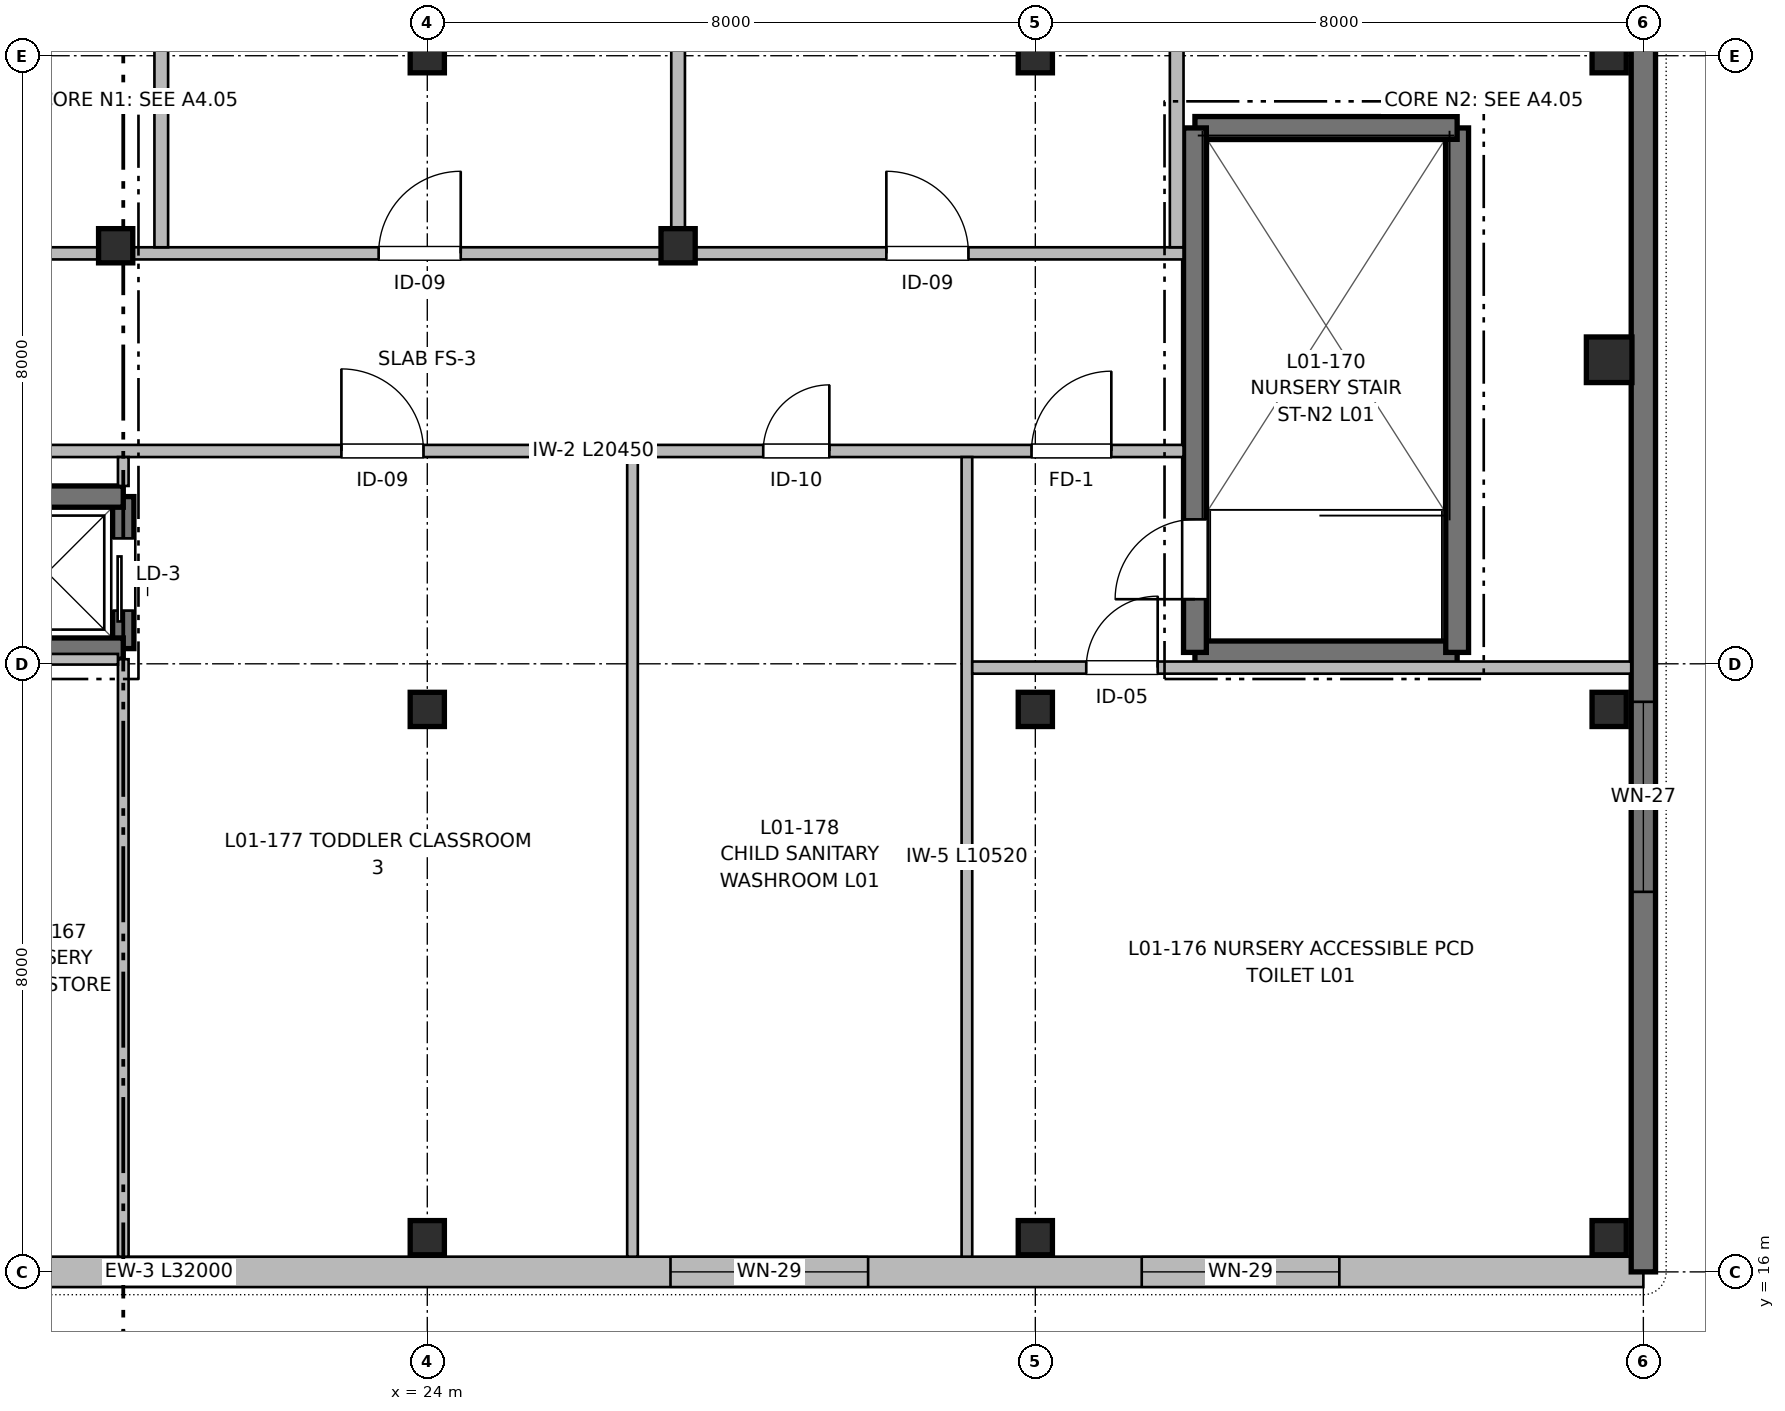
"""IFC4 building model, lengths in metres.
Left out: names, types, materials, properties, quantities, classifications, styles, units other than length and angle.
Written with IfcOpenShell. Run it as: python <this file> out.ifc"""

import sys

from ifc_helpers import new_model, si_unit, direction, frame, frame_2d, origin, origin_2d, place, context, subcontext, project, spatial, rectangle, extrude, element, fill, save


model = new_model("IFC4")
c1 = context("Model", 3, precision=1e-05, world=origin(), true_north=direction((0.0, 1.0)))
c2 = subcontext(c1, "Body", "Model", "MODEL_VIEW")
j1 = project(units=[si_unit("LENGTHUNIT", "METRE"), si_unit("PLANEANGLEUNIT", "RADIAN")], contexts=[c1])
p1 = place(None, origin())
s1 = spatial("IfcSite", under=j1, at=p1, CompositionType="ELEMENT")
p2 = place(p1, origin())
s2 = spatial("IfcBuilding", under=s1, at=p2, CompositionType="ELEMENT")
p3 = place(p2, frame((0.0, 0.0, 4.16)))
s3 = spatial("IfcBuildingStorey", under=s2, at=p3, CompositionType="ELEMENT", Elevation=4.16)
p4 = place(p3, frame((19.9, 29.5, 0.0), z_axis=(0.0, 0.0, 1.0), x_axis=(1.0, 0.0, 0.0)))
e1 = element("IfcColumn", 1, at=p4, inside=s3, PredefinedType="COLUMN", context=c2, shape_type="SweptSolid", body=[
    extrude(rectangle(XDim=0.45, YDim=0.45, at=origin_2d()), origin(), (0.0, 0.0, 1.0), 4.89),
])
for number, where, z_axis, x_axis in (
    (2, (24.0, 16.45, 0.0), (0.0, 0.0, 1.0), (1.0, 0.0, 0.0)),
    (3, (24.0, 23.4, 0.0), (0.0, 0.0, 1.0), (1.0, 0.0, 0.0)),
    (4, (24.0, 32.0, 0.0), (0.0, 0.0, 1.0), (1.0, 0.0, 0.0)),
):
    element("IfcColumn", number, at=place(p3, frame(where, z_axis=z_axis, x_axis=x_axis)), inside=s3, PredefinedType="COLUMN", context=c2, shape_type="SweptSolid", body=[
        extrude(rectangle(XDim=0.45, YDim=0.45, at=origin_2d()), origin(), (0.0, 0.0, 1.0), 3.2),
    ])
p5 = place(p3, frame((27.3, 29.5, 0.0), z_axis=(0.0, 0.0, 1.0), x_axis=(1.0, 0.0, 0.0)))
e5 = element("IfcColumn", 5, at=p5, inside=s3, PredefinedType="COLUMN", context=c2, shape_type="SweptSolid", body=[
    extrude(rectangle(XDim=0.45, YDim=0.45, at=origin_2d()), origin(), (0.0, 0.0, 1.0), 4.89),
])
for number, where, z_axis, x_axis in (
    (6, (32.0, 16.45, 0.0), (0.0, 0.0, 1.0), (1.0, 0.0, 0.0)),
    (7, (32.0, 23.4, 0.0), (0.0, 0.0, 1.0), (1.0, 0.0, 0.0)),
    (8, (32.0, 32.0, 0.0), (0.0, 0.0, 1.0), (1.0, 0.0, 0.0)),
    (9, (39.55, 16.45, 0.0), (0.0, 0.0, 1.0), (1.0, 0.0, 0.0)),
    (10, (39.55, 23.4, 0.0), (0.0, 0.0, 1.0), (1.0, 0.0, 0.0)),
):
    element("IfcColumn", number, at=place(p3, frame(where, z_axis=z_axis, x_axis=x_axis)), inside=s3, PredefinedType="COLUMN", context=c2, shape_type="SweptSolid", body=[
        extrude(rectangle(XDim=0.45, YDim=0.45, at=origin_2d()), origin(), (0.0, 0.0, 1.0), 3.2),
    ])
p6 = place(p3, frame((39.55, 28.0, 0.0), z_axis=(0.0, 0.0, 1.0), x_axis=(1.0, 0.0, 0.0)))
e11 = element("IfcColumn", 11, at=p6, inside=s3, PredefinedType="COLUMN", context=c2, shape_type="SweptSolid", body=[
    extrude(rectangle(XDim=0.6, YDim=0.6, at=origin_2d()), origin(), (0.0, 0.0, 1.0), 5.19),
])
p7 = place(p3, frame((39.55, 32.0, 0.0), z_axis=(0.0, 0.0, 1.0), x_axis=(1.0, 0.0, 0.0)))
e12 = element("IfcColumn", 12, at=p7, inside=s3, PredefinedType="COLUMN", context=c2, shape_type="SweptSolid", body=[
    extrude(rectangle(XDim=0.45, YDim=0.45, at=origin_2d()), origin(), (0.0, 0.0, 1.0), 3.2),
])
p8 = place(p3, frame((40.0, 16.0, 0.0), z_axis=(0.0, 0.0, 1.0), x_axis=(-1.0, 0.0, 0.0)))
e13 = element("IfcWall", 13, at=p8, inside=s3, PredefinedType="SOLIDWALL", context=c2, shape_type="SweptSolid", body=[
    extrude(rectangle(XDim=32.0, YDim=0.4, at=frame_2d((16.0, 0.0))), origin(), (0.0, 0.0, 1.0), 3.06),
])
p9 = place(p8, frame((4.0, 0.0, 1.32)))
e14 = element("IfcOpeningElement", 14, at=p9, cuts=e13, PredefinedType="OPENING", context=c2, shape_type="SweptSolid", body=[
    extrude(rectangle(XDim=2.6, YDim=0.9, at=frame_2d((1.3, 0.45))), frame((0.0, 0.21, 0.0), z_axis=(0.0, -1.0, 0.0), x_axis=(1.0, 0.0, 0.0)), (0.0, 0.0, 1.0), 0.42),
])
p10 = place(p8, frame((10.2, 0.0, 1.32)))
e15 = element("IfcOpeningElement", 15, at=p10, cuts=e13, PredefinedType="OPENING", context=c2, shape_type="SweptSolid", body=[
    extrude(rectangle(XDim=2.6, YDim=0.9, at=frame_2d((1.3, 0.45))), frame((0.0, 0.21, 0.0), z_axis=(0.0, -1.0, 0.0), x_axis=(1.0, 0.0, 0.0)), (0.0, 0.0, 1.0), 0.42),
])
p11 = place(p8, frame((26.0, 0.0, 1.32)))
e16 = element("IfcOpeningElement", 16, at=p11, cuts=e13, PredefinedType="OPENING", context=c2, shape_type="SweptSolid", body=[
    extrude(rectangle(XDim=2.6, YDim=0.9, at=frame_2d((1.3, 0.45))), frame((0.0, 0.21, 0.0), z_axis=(0.0, -1.0, 0.0), x_axis=(1.0, 0.0, 0.0)), (0.0, 0.0, 1.0), 0.42),
])
p12 = place(p3, frame((40.0, 40.0, 0.0), z_axis=(0.0, 0.0, 1.0), x_axis=(0.0, -1.0, 0.0)))
e17 = element("IfcWall", 17, at=p12, inside=s3, PredefinedType="SHEAR", context=c2, shape_type="SweptSolid", body=[
    extrude(rectangle(XDim=24.0, YDim=0.32, at=frame_2d((12.0, 0.0))), origin(), (0.0, 0.0, 1.0), 3.06),
])
p13 = place(p12, frame((4.5, 0.0, 0.57)))
e18 = element("IfcOpeningElement", 18, at=p13, cuts=e17, PredefinedType="OPENING", context=c2, shape_type="SweptSolid", body=[
    extrude(rectangle(XDim=2.5, YDim=1.65, at=frame_2d((1.25, 0.825))), frame((0.0, 0.17, 0.0), z_axis=(0.0, -1.0, 0.0), x_axis=(1.0, 0.0, 0.0)), (0.0, 0.0, 1.0), 0.34),
])
p14 = place(p12, frame((16.5, 0.0, 0.57)))
e19 = element("IfcOpeningElement", 19, at=p14, cuts=e17, PredefinedType="OPENING", context=c2, shape_type="SweptSolid", body=[
    extrude(rectangle(XDim=2.5, YDim=1.65, at=frame_2d((1.25, 0.825))), frame((0.0, 0.17, 0.0), z_axis=(0.0, -1.0, 0.0), x_axis=(1.0, 0.0, 0.0)), (0.0, 0.0, 1.0), 0.34),
])
p15 = place(p3, frame((34.1, 24.15, 0.0), z_axis=(0.0, 0.0, 1.0), x_axis=(1.0, 0.0, 0.0)))
e20 = element("IfcWall", 20, at=p15, inside=s3, PredefinedType="SHEAR", context=c2, shape_type="SweptSolid", body=[
    extrude(rectangle(XDim=3.45, YDim=0.3, at=frame_2d((1.725, 0.0))), origin(), (0.0, 0.0, 1.0), 3.2),
])
p16 = place(p3, frame((37.55, 31.05, 0.0), z_axis=(0.0, 0.0, 1.0), x_axis=(0.0, -1.0, 0.0)))
e21 = element("IfcWall", 21, at=p16, inside=s3, PredefinedType="SHEAR", context=c2, shape_type="SweptSolid", body=[
    extrude(rectangle(XDim=6.9, YDim=0.3, at=frame_2d((3.45, 0.0))), origin(), (0.0, 0.0, 1.0), 3.2),
])
p17 = place(p3, frame((34.1, 31.05, 0.0), z_axis=(0.0, 0.0, 1.0), x_axis=(1.0, 0.0, 0.0)))
e22 = element("IfcWall", 22, at=p17, inside=s3, PredefinedType="SHEAR", context=c2, shape_type="SweptSolid", body=[
    extrude(rectangle(XDim=3.45, YDim=0.3, at=frame_2d((1.725, 0.0))), origin(), (0.0, 0.0, 1.0), 3.2),
])
p18 = place(p3, frame((34.1, 24.15, 0.0), z_axis=(0.0, 0.0, 1.0), x_axis=(0.0, 1.0, 0.0)))
e23 = element("IfcWall", 23, at=p18, inside=s3, PredefinedType="SHEAR", context=c2, shape_type="SweptSolid", body=[
    extrude(rectangle(XDim=6.9, YDim=0.3, at=frame_2d((3.45, 0.0))), origin(), (0.0, 0.0, 1.0), 3.2),
])
p19 = place(p18, frame((0.7, 0.0, 0.0)))
e24 = element("IfcOpeningElement", 24, at=p19, cuts=e23, PredefinedType="OPENING", context=c2, shape_type="SweptSolid", body=[
    extrude(rectangle(XDim=1.05, YDim=2.15, at=frame_2d((0.525, 1.075))), frame((0.0, 0.16, 0.0), z_axis=(0.0, -1.0, 0.0), x_axis=(1.0, 0.0, 0.0)), (0.0, 0.0, 1.0), 0.32),
])
p20 = place(p3, frame((20.0, 24.2, 0.0), z_axis=(0.0, 0.0, 1.0), x_axis=(0.0, 1.0, 0.0)))
e25 = element("IfcWall", 25, at=p20, inside=s3, PredefinedType="SHEAR", context=c2, shape_type="SweptSolid", body=[
    extrude(rectangle(XDim=2.0, YDim=0.28, at=frame_2d((1.0, 0.0))), origin(), (0.0, 0.0, 1.0), 3.06),
])
p21 = place(p20, frame((0.5, 0.0, 0.0)))
e26 = element("IfcOpeningElement", 26, at=p21, cuts=e25, PredefinedType="OPENING", context=c2, shape_type="SweptSolid", body=[
    extrude(rectangle(XDim=0.95, YDim=2.15, at=frame_2d((0.475, 1.075))), frame((0.0, 0.15, 0.0), z_axis=(0.0, -1.0, 0.0), x_axis=(1.0, 0.0, 0.0)), (0.0, 0.0, 1.0), 0.3),
])
for number, where, z_axis, x_axis in (
    (27, (18.0, 24.2, 0.0), (0.0, 0.0, 1.0), (1.0, 0.0, 0.0)),
    (28, (18.0, 26.2, 0.0), (0.0, 0.0, 1.0), (1.0, 0.0, 0.0)),
):
    element("IfcWall", number, at=place(p3, frame(where, z_axis=z_axis, x_axis=x_axis)), inside=s3, PredefinedType="SHEAR", context=c2, shape_type="SweptSolid", body=[
        extrude(rectangle(XDim=2.0, YDim=0.28, at=frame_2d((1.0, 0.0))), origin(), (0.0, 0.0, 1.0), 3.06),
    ])
p22 = place(p3, frame((13.5, 26.8, 0.0), z_axis=(0.0, 0.0, 1.0), x_axis=(1.0, 0.0, 0.0)))
e29 = element("IfcWall", 29, at=p22, inside=s3, PredefinedType="PARTITIONING", context=c2, shape_type="SweptSolid", body=[
    extrude(rectangle(XDim=20.45, YDim=0.16, at=frame_2d((10.225, 0.0))), origin(), (0.0, 0.0, 1.0), 2.94),
])
p23 = place(p22, frame((1.65, 0.0, 0.0)))
e30 = element("IfcOpeningElement", 30, at=p23, cuts=e29, PredefinedType="OPENING", context=c2, shape_type="SweptSolid", body=[
    extrude(rectangle(XDim=1.05, YDim=2.15, at=frame_2d((0.525, 1.075))), frame((0.0, 0.09, 0.0), z_axis=(0.0, -1.0, 0.0), x_axis=(1.0, 0.0, 0.0)), (0.0, 0.0, 1.0), 0.18),
])
p24 = place(p22, frame((18.45, 0.0, 0.0)))
e31 = element("IfcOpeningElement", 31, at=p24, cuts=e29, PredefinedType="OPENING", context=c2, shape_type="SweptSolid", body=[
    extrude(rectangle(XDim=1.05, YDim=2.15, at=frame_2d((0.525, 1.075))), frame((0.0, 0.09, 0.0), z_axis=(0.0, -1.0, 0.0), x_axis=(1.0, 0.0, 0.0)), (0.0, 0.0, 1.0), 0.18),
])
p25 = place(p22, frame((9.37, 0.0, 0.0)))
e32 = element("IfcOpeningElement", 32, at=p25, cuts=e29, PredefinedType="OPENING", context=c2, shape_type="SweptSolid", body=[
    extrude(rectangle(XDim=1.08, YDim=2.15, at=frame_2d((0.54, 1.075))), frame((0.0, 0.09, 0.0), z_axis=(0.0, -1.0, 0.0), x_axis=(1.0, 0.0, 0.0)), (0.0, 0.0, 1.0), 0.18),
])
p26 = place(p22, frame((14.92, 0.0, 0.0)))
e33 = element("IfcOpeningElement", 33, at=p26, cuts=e29, PredefinedType="OPENING", context=c2, shape_type="SweptSolid", body=[
    extrude(rectangle(XDim=0.87, YDim=2.05, at=frame_2d((0.435, 1.025))), frame((0.0, 0.09, 0.0), z_axis=(0.0, -1.0, 0.0), x_axis=(1.0, 0.0, 0.0)), (0.0, 0.0, 1.0), 0.18),
])
p27 = place(p3, frame((13.5, 29.4, 0.0), z_axis=(0.0, 0.0, 1.0), x_axis=(1.0, 0.0, 0.0)))
e34 = element("IfcWall", 34, at=p27, inside=s3, PredefinedType="PARTITIONING", context=c2, shape_type="SweptSolid", body=[
    extrude(rectangle(XDim=20.45, YDim=0.16, at=frame_2d((10.225, 0.0))), origin(), (0.0, 0.0, 1.0), 2.94),
])
p28 = place(p27, frame((3.005, 0.0, 0.0)))
e35 = element("IfcOpeningElement", 35, at=p28, cuts=e34, PredefinedType="OPENING", context=c2, shape_type="SweptSolid", body=[
    extrude(rectangle(XDim=1.08, YDim=2.15, at=frame_2d((0.54, 1.075))), frame((0.0, 0.09, 0.0), z_axis=(0.0, -1.0, 0.0), x_axis=(1.0, 0.0, 0.0)), (0.0, 0.0, 1.0), 0.18),
])
p29 = place(p27, frame((9.86, 0.0, 0.0)))
e36 = element("IfcOpeningElement", 36, at=p29, cuts=e34, PredefinedType="OPENING", context=c2, shape_type="SweptSolid", body=[
    extrude(rectangle(XDim=1.08, YDim=2.15, at=frame_2d((0.54, 1.075))), frame((0.0, 0.09, 0.0), z_axis=(0.0, -1.0, 0.0), x_axis=(1.0, 0.0, 0.0)), (0.0, 0.0, 1.0), 0.18),
])
p30 = place(p27, frame((16.54, 0.0, 0.0)))
e37 = element("IfcOpeningElement", 37, at=p30, cuts=e34, PredefinedType="OPENING", context=c2, shape_type="SweptSolid", body=[
    extrude(rectangle(XDim=1.08, YDim=2.15, at=frame_2d((0.54, 1.075))), frame((0.0, 0.09, 0.0), z_axis=(0.0, -1.0, 0.0), x_axis=(1.0, 0.0, 0.0)), (0.0, 0.0, 1.0), 0.18),
])
p31 = place(p3, frame((20.0, 16.2, 0.0), z_axis=(0.0, 0.0, 1.0), x_axis=(0.0, 1.0, 0.0)))
e38 = element("IfcWall", 38, at=p31, inside=s3, PredefinedType="PARTITIONING", context=c2, shape_type="SweptSolid", body=[
    extrude(rectangle(XDim=7.86, YDim=0.14, at=frame_2d((3.93, 0.0))), origin(), (0.0, 0.0, 1.0), 2.94),
])
p32 = place(p3, frame((20.0, 26.34, 0.0), z_axis=(0.0, 0.0, 1.0), x_axis=(0.0, 1.0, 0.0)))
e39 = element("IfcWall", 39, at=p32, inside=s3, PredefinedType="PARTITIONING", context=c2, shape_type="SweptSolid", body=[
    extrude(rectangle(XDim=0.38, YDim=0.14, at=frame_2d((0.19, 0.0))), origin(), (0.0, 0.0, 1.0), 2.94),
])
p33 = place(p3, frame((31.1, 16.2, 0.0), z_axis=(0.0, 0.0, 1.0), x_axis=(0.0, 1.0, 0.0)))
e40 = element("IfcWall", 40, at=p33, inside=s3, PredefinedType="PARTITIONING", context=c2, shape_type="SweptSolid", body=[
    extrude(rectangle(XDim=10.52, YDim=0.14, at=frame_2d((5.26, 0.0))), origin(), (0.0, 0.0, 1.0), 2.94),
])
p34 = place(p3, frame((18.07, 24.06, 0.0), z_axis=(0.0, 0.0, 1.0), x_axis=(1.0, 0.0, 0.0)))
e41 = element("IfcWall", 41, at=p34, inside=s3, PredefinedType="PARTITIONING", context=c2, shape_type="SweptSolid", body=[
    extrude(rectangle(XDim=1.86, YDim=0.14, at=frame_2d((0.93, 0.0))), origin(), (0.0, 0.0, 1.0), 2.94),
])
for number, where, z_axis, x_axis in (
    (42, (20.5, 29.48, 0.0), (0.0, 0.0, 1.0), (0.0, 1.0, 0.0)),
    (43, (27.3, 29.48, 0.0), (0.0, 0.0, 1.0), (0.0, 1.0, 0.0)),
    (44, (33.86, 29.48, 0.0), (0.0, 0.0, 1.0), (0.0, 1.0, 0.0)),
):
    element("IfcWall", number, at=place(p3, frame(where, z_axis=z_axis, x_axis=x_axis)), inside=s3, PredefinedType="PARTITIONING", context=c2, shape_type="SweptSolid", body=[
        extrude(rectangle(XDim=10.32, YDim=0.18, at=frame_2d((5.16, 0.0))), origin(), (0.0, 0.0, 1.0), 2.94),
    ])
p35 = place(p3, frame((31.17, 23.95, 0.0), z_axis=(0.0, 0.0, 1.0), x_axis=(1.0, 0.0, 0.0)))
e45 = element("IfcWall", 45, at=p35, inside=s3, PredefinedType="PARTITIONING", context=c2, shape_type="SweptSolid", body=[
    extrude(rectangle(XDim=8.67, YDim=0.16, at=frame_2d((4.335, 0.0))), origin(), (0.0, 0.0, 1.0), 2.94),
])
p36 = place(p35, frame((1.5, 0.0, 0.0)))
e46 = element("IfcOpeningElement", 46, at=p36, cuts=e45, PredefinedType="OPENING", context=c2, shape_type="SweptSolid", body=[
    extrude(rectangle(XDim=0.94, YDim=2.1, at=frame_2d((0.47, 1.05))), frame((0.0, 0.09, 0.0), z_axis=(0.0, -1.0, 0.0), x_axis=(1.0, 0.0, 0.0)), (0.0, 0.0, 1.0), 0.18),
])
p37 = place(p3, frame((26.7, 16.2, 0.0), z_axis=(0.0, 0.0, 1.0), x_axis=(0.0, 1.0, 0.0)))
e47 = element("IfcWall", 47, at=p37, inside=s3, PredefinedType="PARTITIONING", context=c2, shape_type="SweptSolid", body=[
    extrude(rectangle(XDim=10.52, YDim=0.14, at=frame_2d((5.26, 0.0))), origin(), (0.0, 0.0, 1.0), 2.94),
])
p38 = place(p9, origin())
e48 = element("IfcWindow", 48, at=p38, inside=s3, PartitioningType="SINGLE_PANEL", PredefinedType="WINDOW", context=c2, shape_type="SweptSolid", body=[
    extrude(rectangle(XDim=2.6, YDim=0.9, at=frame_2d((1.3, 0.45))), frame((0.0, 0.03, 0.0), z_axis=(0.0, -1.0, 0.0), x_axis=(1.0, 0.0, 0.0)), (0.0, 0.0, 1.0), 0.06),
])
fill(e14, e48)
p39 = place(p10, origin())
e49 = element("IfcWindow", 49, at=p39, inside=s3, PartitioningType="SINGLE_PANEL", PredefinedType="WINDOW", context=c2, shape_type="SweptSolid", body=[
    extrude(rectangle(XDim=2.6, YDim=0.9, at=frame_2d((1.3, 0.45))), frame((0.0, 0.03, 0.0), z_axis=(0.0, -1.0, 0.0), x_axis=(1.0, 0.0, 0.0)), (0.0, 0.0, 1.0), 0.06),
])
fill(e15, e49)
p40 = place(p14, origin())
e50 = element("IfcWindow", 50, at=p40, inside=s3, PartitioningType="SINGLE_PANEL", PredefinedType="WINDOW", context=c2, shape_type="SweptSolid", body=[
    extrude(rectangle(XDim=2.5, YDim=1.65, at=frame_2d((1.25, 0.825))), frame((0.0, 0.03, 0.0), z_axis=(0.0, -1.0, 0.0), x_axis=(1.0, 0.0, 0.0)), (0.0, 0.0, 1.0), 0.06),
])
fill(e19, e50)
p41 = place(p19, origin())
e51 = element("IfcDoor", 51, at=p41, inside=s3, OperationType="SINGLE_SWING_LEFT", PredefinedType="DOOR", context=c2, shape_type="SweptSolid", body=[
    extrude(rectangle(XDim=1.05, YDim=2.15, at=frame_2d((0.525, 1.075))), frame((0.0, 0.025, 0.0), z_axis=(0.0, -1.0, 0.0), x_axis=(1.0, 0.0, 0.0)), (0.0, 0.0, 1.0), 0.05),
])
fill(e24, e51)
p42 = place(p21, origin())
e52 = element("IfcDoor", 52, at=p42, inside=s3, OperationType="SLIDING_TO_LEFT", PredefinedType="DOOR", context=c2, shape_type="SweptSolid", body=[
    extrude(rectangle(XDim=0.95, YDim=2.15, at=frame_2d((0.475, 1.075))), frame((0.0, 0.025, 0.0), z_axis=(0.0, -1.0, 0.0), x_axis=(1.0, 0.0, 0.0)), (0.0, 0.0, 1.0), 0.05),
])
fill(e26, e52)
p43 = place(p24, origin())
e53 = element("IfcDoor", 53, at=p43, inside=s3, OperationType="SINGLE_SWING_RIGHT", PredefinedType="DOOR", context=c2, shape_type="SweptSolid", body=[
    extrude(rectangle(XDim=1.05, YDim=2.15, at=frame_2d((0.525, 1.075))), frame((0.0, 0.025, 0.0), z_axis=(0.0, -1.0, 0.0), x_axis=(1.0, 0.0, 0.0)), (0.0, 0.0, 1.0), 0.05),
])
fill(e31, e53)
p44 = place(p29, origin())
e54 = element("IfcDoor", 54, at=p44, inside=s3, OperationType="SINGLE_SWING_RIGHT", PredefinedType="DOOR", context=c2, shape_type="SweptSolid", body=[
    extrude(rectangle(XDim=1.08, YDim=2.15, at=frame_2d((0.54, 1.075))), frame((0.0, 0.025, 0.0), z_axis=(0.0, -1.0, 0.0), x_axis=(1.0, 0.0, 0.0)), (0.0, 0.0, 1.0), 0.05),
])
fill(e36, e54)
p45 = place(p30, origin())
e55 = element("IfcDoor", 55, at=p45, inside=s3, OperationType="SINGLE_SWING_LEFT", PredefinedType="DOOR", context=c2, shape_type="SweptSolid", body=[
    extrude(rectangle(XDim=1.08, YDim=2.15, at=frame_2d((0.54, 1.075))), frame((0.0, 0.025, 0.0), z_axis=(0.0, -1.0, 0.0), x_axis=(1.0, 0.0, 0.0)), (0.0, 0.0, 1.0), 0.05),
])
fill(e37, e55)
p46 = place(p36, origin())
e56 = element("IfcDoor", 56, at=p46, inside=s3, OperationType="SINGLE_SWING_RIGHT", PredefinedType="DOOR", context=c2, shape_type="SweptSolid", body=[
    extrude(rectangle(XDim=0.94, YDim=2.1, at=frame_2d((0.47, 1.05))), frame((0.0, 0.025, 0.0), z_axis=(0.0, -1.0, 0.0), x_axis=(1.0, 0.0, 0.0)), (0.0, 0.0, 1.0), 0.05),
])
fill(e46, e56)
p47 = place(p25, origin())
e57 = element("IfcDoor", 57, at=p47, inside=s3, OperationType="SINGLE_SWING_LEFT", PredefinedType="DOOR", context=c2, shape_type="SweptSolid", body=[
    extrude(rectangle(XDim=1.08, YDim=2.15, at=frame_2d((0.54, 1.075))), frame((0.0, 0.025, 0.0), z_axis=(0.0, -1.0, 0.0), x_axis=(1.0, 0.0, 0.0)), (0.0, 0.0, 1.0), 0.05),
])
fill(e32, e57)
p48 = place(p26, origin())
e58 = element("IfcDoor", 58, at=p48, inside=s3, OperationType="SINGLE_SWING_RIGHT", PredefinedType="DOOR", context=c2, shape_type="SweptSolid", body=[
    extrude(rectangle(XDim=0.87, YDim=2.05, at=frame_2d((0.435, 1.025))), frame((0.0, 0.025, 0.0), z_axis=(0.0, -1.0, 0.0), x_axis=(1.0, 0.0, 0.0)), (0.0, 0.0, 1.0), 0.05),
])
fill(e33, e58)
save(model, sys.argv[1])
